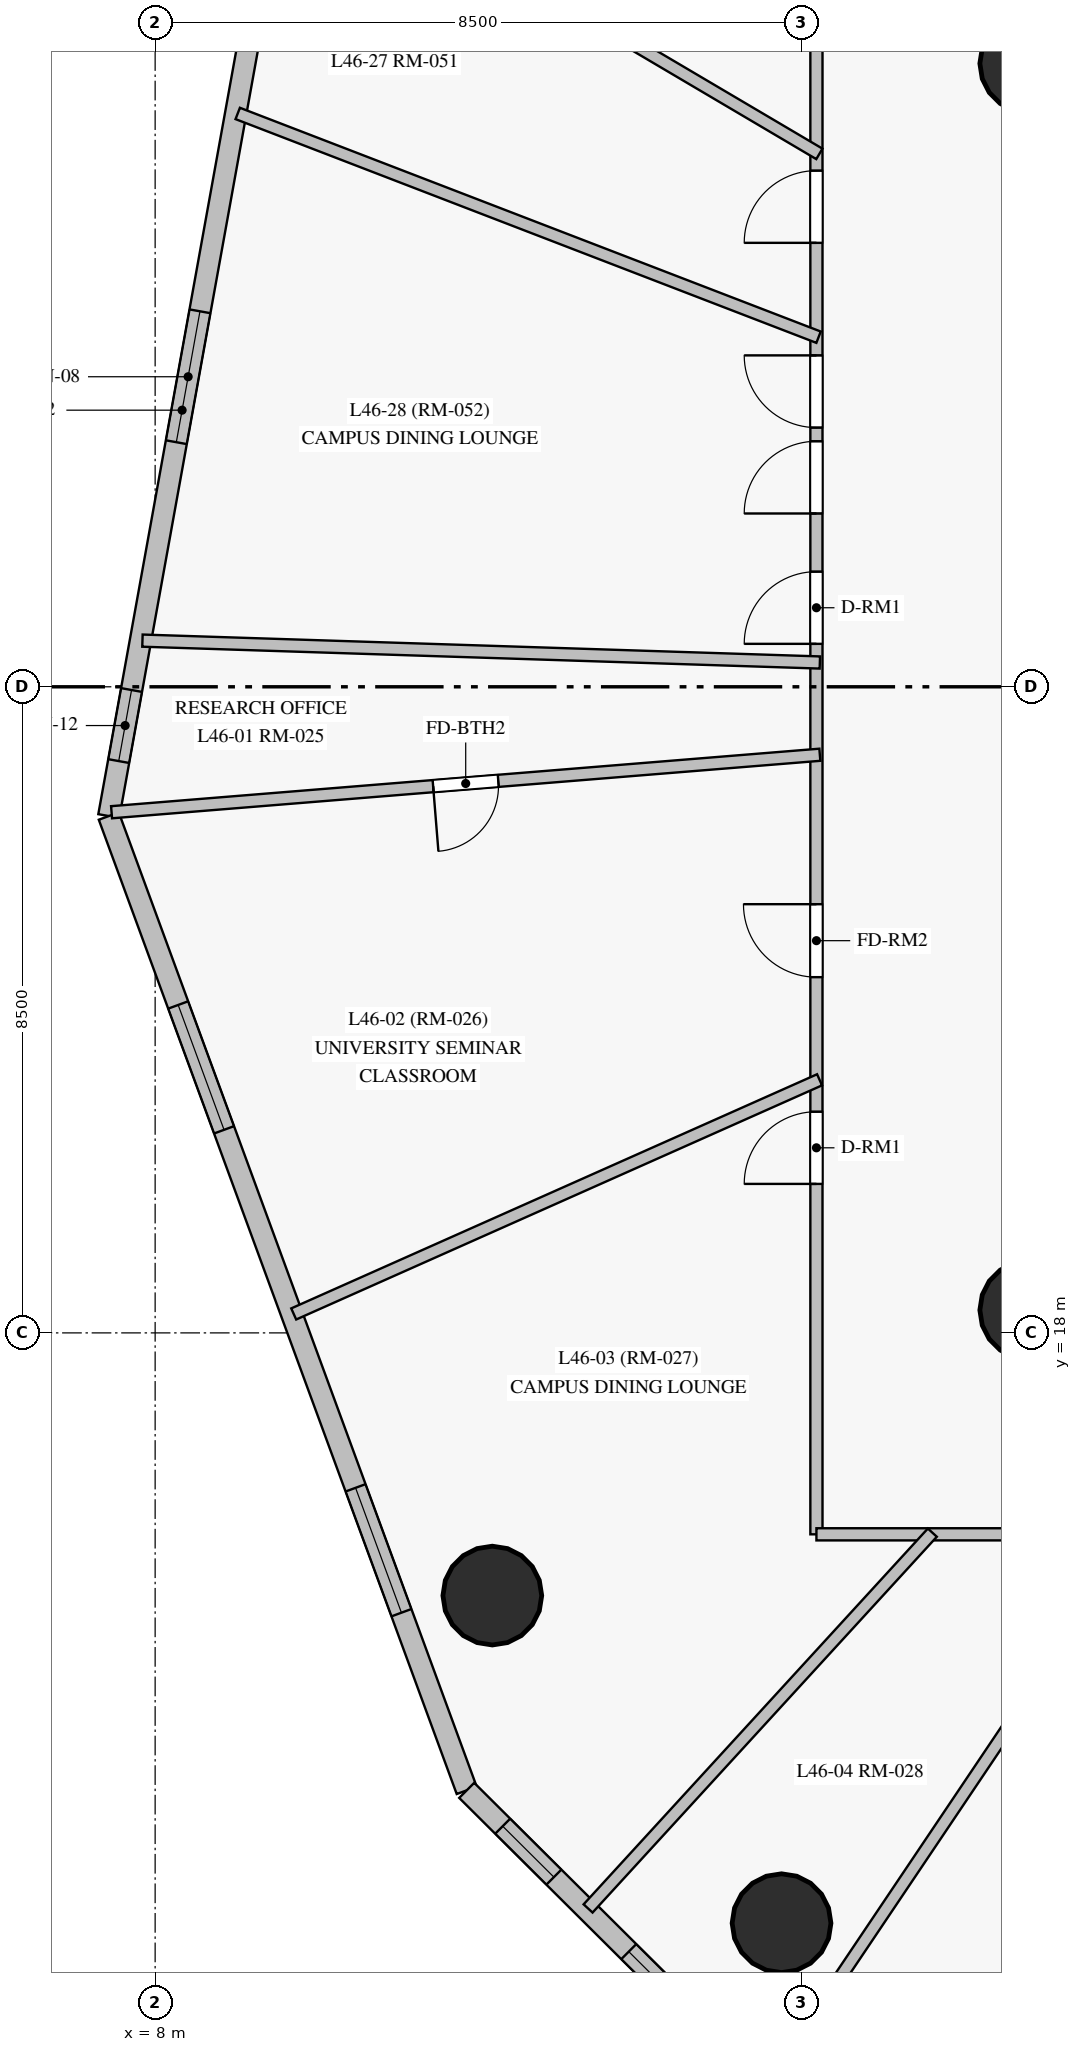
"""IFC4 building model, lengths in metres.
Left out: names, types, materials, properties, quantities, classifications, styles, units other than length and angle.
Written with IfcOpenShell. Run it as: python <this file> out.ifc"""

import sys

from ifc_helpers import new_model, si_unit, direction, frame, frame_2d, origin, origin_with_axes, origin_2d, place, context, subcontext, project, spatial, rectangle, circle, extrude, source, transform, mapped, element, fill, save


model = new_model("IFC4")
c1 = context("Model", 3, precision=1e-05, world=origin(), true_north=direction((0.0, 1.0)))
c2 = subcontext(c1, "Body", "Model", "MODEL_VIEW")
j1 = project(units=[si_unit("LENGTHUNIT", "METRE"), si_unit("PLANEANGLEUNIT", "RADIAN")], contexts=[c1])
p1 = place(None, origin())
s1 = spatial("IfcSite", under=j1, at=p1, CompositionType="ELEMENT")
p2 = place(p1, origin())
s2 = spatial("IfcBuilding", under=s1, at=p2, CompositionType="ELEMENT")
p3 = place(p2, frame((0.0, 0.0, 162.65)))
s3 = spatial("IfcBuildingStorey", under=s2, at=p3, CompositionType="ELEMENT", Elevation=162.65)
m1 = source(origin_with_axes(), c2, "Body", "SweptSolid", [
    extrude(circle(Radius=0.65, at=origin_2d()), origin(), (0.0, 0.0, 1.0), 3.05),
])
for number, where, z_axis, x_axis in (
    (1, (19.5, 18.3, 0.0), (0.0, 0.0, 1.0), (1.0, 0.0, 0.0)),
    (2, (19.5, 34.7, 0.0), (0.0, 0.0, 1.0), (1.0, 0.0, 0.0)),
    (3, (12.436, 14.544, 0.0), (0.0, 0.0, 1.0), (1.0, 0.0, 0.0)),
    (4, (16.241, 10.234, 0.0), (0.0, 0.0, 1.0), (1.0, 0.0, 0.0)),
):
    element("IfcColumn", number, at=place(p3, frame(where, z_axis=z_axis, x_axis=x_axis)), inside=s3, PredefinedType="COLUMN", context=c2, shape_type="MappedRepresentation", body=[
        mapped(m1, transform((0.0, 0.0, 0.0), scale=1.0)),
    ])
p4 = place(p3, frame((9.319, 35.479, 0.0), z_axis=(0.0, 0.0, 1.0), x_axis=(-0.177764832346, -0.984072997486, 0.0)))
e5 = element("IfcWall", 5, at=p4, inside=s3, PredefinedType="SOLIDWALL", context=c2, shape_type="SweptSolid", body=[
    extrude(rectangle(XDim=10.853, YDim=0.28, at=frame_2d((5.426, 0.0))), origin(), (0.0, 0.0, 1.0), 2.825),
])
p5 = place(p4, frame((4.104, 0.0, 0.85)))
e6 = element("IfcOpeningElement", 6, at=p5, cuts=e5, PredefinedType="OPENING", context=c2, shape_type="SweptSolid", body=[
    extrude(rectangle(XDim=1.75, YDim=1.65, at=frame_2d((0.875, 0.825))), frame((0.0, 0.15, 0.0), z_axis=(0.0, -1.0, 0.0), x_axis=(1.0, 0.0, 0.0)), (0.0, 0.0, 1.0), 0.3),
])
p6 = place(p4, frame((9.167, 0.0, 0.85)))
e7 = element("IfcOpeningElement", 7, at=p6, cuts=e5, PredefinedType="OPENING", context=c2, shape_type="SweptSolid", body=[
    extrude(rectangle(XDim=0.95, YDim=1.5, at=frame_2d((0.475, 0.75))), frame((0.0, 0.15, 0.0), z_axis=(0.0, -1.0, 0.0), x_axis=(1.0, 0.0, 0.0)), (0.0, 0.0, 1.0), 0.3),
])
p7 = place(p3, frame((7.39, 24.799, 0.0), z_axis=(0.0, 0.0, 1.0), x_axis=(0.344841895518, -0.938660783828, 0.0)))
e8 = element("IfcWall", 8, at=p7, inside=s3, PredefinedType="SOLIDWALL", context=c2, shape_type="SweptSolid", body=[
    extrude(rectangle(XDim=13.656, YDim=0.28, at=frame_2d((6.828, 0.0))), origin(), (0.0, 0.0, 1.0), 2.825),
])
p8 = place(p7, frame((2.648, 0.0, 0.85)))
e9 = element("IfcOpeningElement", 9, at=p8, cuts=e8, PredefinedType="OPENING", context=c2, shape_type="SweptSolid", body=[
    extrude(rectangle(XDim=1.75, YDim=1.65, at=frame_2d((0.875, 0.825))), frame((0.0, 0.15, 0.0), z_axis=(0.0, -1.0, 0.0), x_axis=(1.0, 0.0, 0.0)), (0.0, 0.0, 1.0), 0.3),
])
p9 = place(p7, frame((9.415, 0.0, 0.85)))
e10 = element("IfcOpeningElement", 10, at=p9, cuts=e8, PredefinedType="OPENING", context=c2, shape_type="SweptSolid", body=[
    extrude(rectangle(XDim=1.75, YDim=1.65, at=frame_2d((0.875, 0.825))), frame((0.0, 0.15, 0.0), z_axis=(0.0, -1.0, 0.0), x_axis=(1.0, 0.0, 0.0)), (0.0, 0.0, 1.0), 0.3),
])
p10 = place(p3, frame((12.099, 11.981, 0.0), z_axis=(0.0, 0.0, 1.0), x_axis=(0.708877198621, -0.705331919932, 0.0)))
e11 = element("IfcWall", 11, at=p10, inside=s3, PredefinedType="SOLIDWALL", context=c2, shape_type="SweptSolid", body=[
    extrude(rectangle(XDim=9.572, YDim=0.28, at=frame_2d((4.786, 0.0))), origin(), (0.0, 0.0, 1.0), 2.825),
])
p11 = place(p10, frame((0.668, 0.0, 0.85)))
e12 = element("IfcOpeningElement", 12, at=p11, cuts=e11, PredefinedType="OPENING", context=c2, shape_type="SweptSolid", body=[
    extrude(rectangle(XDim=0.95, YDim=1.5, at=frame_2d((0.475, 0.75))), frame((0.0, 0.15, 0.0), z_axis=(0.0, -1.0, 0.0), x_axis=(1.0, 0.0, 0.0)), (0.0, 0.0, 1.0), 0.3),
])
p12 = place(p10, frame((3.008, 0.0, 0.85)))
e13 = element("IfcOpeningElement", 13, at=p12, cuts=e11, PredefinedType="OPENING", context=c2, shape_type="SweptSolid", body=[
    extrude(rectangle(XDim=1.75, YDim=1.65, at=frame_2d((0.875, 0.825))), frame((0.0, 0.15, 0.0), z_axis=(0.0, -1.0, 0.0), x_axis=(1.0, 0.0, 0.0)), (0.0, 0.0, 1.0), 0.3),
])
p13 = place(p10, frame((6.338, 0.0, 0.85)))
e14 = element("IfcOpeningElement", 14, at=p13, cuts=e11, PredefinedType="OPENING", context=c2, shape_type="SweptSolid", body=[
    extrude(rectangle(XDim=1.75, YDim=1.65, at=frame_2d((0.875, 0.825))), frame((0.0, 0.15, 0.0), z_axis=(0.0, -1.0, 0.0), x_axis=(1.0, 0.0, 0.0)), (0.0, 0.0, 1.0), 0.3),
])
p14 = place(p3, frame((16.7, 15.35, 0.0), z_axis=(0.0, 0.0, 1.0), x_axis=(0.0, 1.0, 0.0)))
e15 = element("IfcWall", 15, at=p14, inside=s3, PredefinedType="PARTITIONING", context=c2, shape_type="SweptSolid", body=[
    extrude(rectangle(XDim=22.3, YDim=0.16, at=frame_2d((11.15, 0.0))), origin(), (0.0, 0.0, 1.0), 2.275),
])
p15 = place(p14, frame((11.715, 0.0, 0.0)))
e16 = element("IfcOpeningElement", 16, at=p15, cuts=e15, PredefinedType="OPENING", context=c2, shape_type="SweptSolid", body=[
    extrude(rectangle(XDim=0.95, YDim=2.15, at=frame_2d((0.475, 1.075))), frame((0.0, 0.09, 0.0), z_axis=(0.0, -1.0, 0.0), x_axis=(1.0, 0.0, 0.0)), (0.0, 0.0, 1.0), 0.18),
])
p16 = place(p14, frame((7.33, 0.0, 0.0)))
e17 = element("IfcOpeningElement", 17, at=p16, cuts=e15, PredefinedType="OPENING", context=c2, shape_type="SweptSolid", body=[
    extrude(rectangle(XDim=0.96, YDim=2.15, at=frame_2d((0.48, 1.075))), frame((0.0, 0.09, 0.0), z_axis=(0.0, -1.0, 0.0), x_axis=(1.0, 0.0, 0.0)), (0.0, 0.0, 1.0), 0.18),
])
p17 = place(p14, frame((4.61, 0.0, 0.0)))
e18 = element("IfcOpeningElement", 18, at=p17, cuts=e15, PredefinedType="OPENING", context=c2, shape_type="SweptSolid", body=[
    extrude(rectangle(XDim=0.95, YDim=2.15, at=frame_2d((0.475, 1.075))), frame((0.0, 0.09, 0.0), z_axis=(0.0, -1.0, 0.0), x_axis=(1.0, 0.0, 0.0)), (0.0, 0.0, 1.0), 0.18),
])
p18 = place(p14, frame((16.99, 0.0, 0.0)))
e19 = element("IfcOpeningElement", 19, at=p18, cuts=e15, PredefinedType="OPENING", context=c2, shape_type="SweptSolid", body=[
    extrude(rectangle(XDim=0.95, YDim=2.15, at=frame_2d((0.475, 1.075))), frame((0.0, 0.09, 0.0), z_axis=(0.0, -1.0, 0.0), x_axis=(1.0, 0.0, 0.0)), (0.0, 0.0, 1.0), 0.18),
])
p19 = place(p14, frame((14.56, 0.0, 0.0)))
e20 = element("IfcOpeningElement", 20, at=p19, cuts=e15, PredefinedType="OPENING", context=c2, shape_type="SweptSolid", body=[
    extrude(rectangle(XDim=0.95, YDim=2.15, at=frame_2d((0.475, 1.075))), frame((0.0, 0.09, 0.0), z_axis=(0.0, -1.0, 0.0), x_axis=(1.0, 0.0, 0.0)), (0.0, 0.0, 1.0), 0.18),
])
p20 = place(p14, frame((13.43, 0.0, 0.0)))
e21 = element("IfcOpeningElement", 21, at=p20, cuts=e15, PredefinedType="OPENING", context=c2, shape_type="SweptSolid", body=[
    extrude(rectangle(XDim=0.95, YDim=2.15, at=frame_2d((0.475, 1.075))), frame((0.0, 0.09, 0.0), z_axis=(0.0, -1.0, 0.0), x_axis=(1.0, 0.0, 0.0)), (0.0, 0.0, 1.0), 0.18),
])
p21 = place(p3, frame((27.55, 15.35, 0.0), z_axis=(0.0, 0.0, 1.0), x_axis=(-1.0, 0.0, 0.0)))
e22 = element("IfcWall", 22, at=p21, inside=s3, PredefinedType="PARTITIONING", context=c2, shape_type="SweptSolid", body=[
    extrude(rectangle(XDim=10.85, YDim=0.16, at=frame_2d((5.425, 0.0))), origin(), (0.0, 0.0, 1.0), 2.375),
])
p22 = place(p21, frame((7.268, 0.0, 0.0)))
e23 = element("IfcOpeningElement", 23, at=p22, cuts=e22, PredefinedType="OPENING", context=c2, shape_type="SweptSolid", body=[
    extrude(rectangle(XDim=0.95, YDim=2.15, at=frame_2d((0.475, 1.075))), frame((0.0, 0.09, 0.0), z_axis=(0.0, -1.0, 0.0), x_axis=(1.0, 0.0, 0.0)), (0.0, 0.0, 1.0), 0.18),
])
p23 = place(p21, frame((4.95, 0.0, 0.0)))
e24 = element("IfcOpeningElement", 24, at=p23, cuts=e22, PredefinedType="OPENING", context=c2, shape_type="SweptSolid", body=[
    extrude(rectangle(XDim=0.95, YDim=2.15, at=frame_2d((0.475, 1.075))), frame((0.0, 0.09, 0.0), z_axis=(0.0, -1.0, 0.0), x_axis=(1.0, 0.0, 0.0)), (0.0, 0.0, 1.0), 0.18),
])
p24 = place(p21, frame((3.282, 0.0, 0.0)))
e25 = element("IfcOpeningElement", 25, at=p24, cuts=e22, PredefinedType="OPENING", context=c2, shape_type="SweptSolid", body=[
    extrude(rectangle(XDim=0.95, YDim=2.15, at=frame_2d((0.475, 1.075))), frame((0.0, 0.09, 0.0), z_axis=(0.0, -1.0, 0.0), x_axis=(1.0, 0.0, 0.0)), (0.0, 0.0, 1.0), 0.18),
])
p25 = place(p3, frame((23.083, 15.39, 0.0), z_axis=(0.0, 0.0, 1.0), x_axis=(-0.433938094177, -0.900942689866, 0.0)))
e26 = element("IfcWall", 26, at=p25, inside=s3, PredefinedType="PARTITIONING", context=c2, shape_type="SweptSolid", body=[
    extrude(rectangle(XDim=10.728, YDim=0.16, at=frame_2d((5.364, 0.0))), origin(), (0.0, 0.0, 1.0), 2.825),
])
p26 = place(p3, frame((16.745, 25.606, 0.0), z_axis=(0.0, 0.0, 1.0), x_axis=(-0.99672193756, -0.080903517766, 0.0)))
e27 = element("IfcWall", 27, at=p26, inside=s3, PredefinedType="PARTITIONING", context=c2, shape_type="SweptSolid", body=[
    extrude(rectangle(XDim=9.349, YDim=0.16, at=frame_2d((4.674, 0.0))), origin(), (0.0, 0.0, 1.0), 2.825),
])
p27 = place(p26, frame((4.244, 0.0, 0.0)))
e28 = element("IfcOpeningElement", 28, at=p27, cuts=e27, PredefinedType="OPENING", context=c2, shape_type="SweptSolid", body=[
    extrude(rectangle(XDim=0.86, YDim=2.04, at=frame_2d((0.43, 1.02))), frame((0.0, 0.09, 0.0), z_axis=(0.0, -1.0, 0.0), x_axis=(1.0, 0.0, 0.0)), (0.0, 0.0, 1.0), 0.18),
])
p28 = place(p3, frame((7.833, 27.107, 0.0), z_axis=(0.0, 0.0, 1.0), x_axis=(0.999478832783, -0.032280997804, 0.0)))
e29 = element("IfcWall", 29, at=p28, inside=s3, PredefinedType="PARTITIONING", context=c2, shape_type="SweptSolid", body=[
    extrude(rectangle(XDim=8.917, YDim=0.16, at=frame_2d((4.458, 0.0))), origin(), (0.0, 0.0, 1.0), 2.825),
])
p29 = place(p3, frame((20.948, 15.375, 0.0), z_axis=(0.0, 0.0, 1.0), x_axis=(-0.557961935119, -0.82986654286, 0.0)))
e30 = element("IfcWall", 30, at=p29, inside=s3, PredefinedType="PARTITIONING", context=c2, shape_type="SweptSolid", body=[
    extrude(rectangle(XDim=8.781, YDim=0.16, at=frame_2d((4.39, 0.0))), origin(), (0.0, 0.0, 1.0), 2.825),
])
p30 = place(p3, frame((16.728, 31.099, 0.0), z_axis=(0.0, 0.0, 1.0), x_axis=(-0.933150299974, 0.359486463805, 0.0)))
e31 = element("IfcWall", 31, at=p30, inside=s3, PredefinedType="PARTITIONING", context=c2, shape_type="SweptSolid", body=[
    extrude(rectangle(XDim=8.189, YDim=0.16, at=frame_2d((4.094, 0.0))), origin(), (0.0, 0.0, 1.0), 2.825),
])
p31 = place(p3, frame((16.741, 21.33, 0.0), z_axis=(0.0, 0.0, 1.0), x_axis=(-0.913526832816, -0.406778472544, 0.0)))
e32 = element("IfcWall", 32, at=p31, inside=s3, PredefinedType="PARTITIONING", context=c2, shape_type="SweptSolid", body=[
    extrude(rectangle(XDim=7.573, YDim=0.16, at=frame_2d((3.787, 0.0))), origin(), (0.0, 0.0, 1.0), 2.825),
])
p32 = place(p3, frame((18.225, 15.372, 0.0), z_axis=(0.0, 0.0, 1.0), x_axis=(-0.675498710577, -0.737361167955, 0.0)))
e33 = element("IfcWall", 33, at=p32, inside=s3, PredefinedType="PARTITIONING", context=c2, shape_type="SweptSolid", body=[
    extrude(rectangle(XDim=6.705, YDim=0.16, at=frame_2d((3.353, 0.0))), origin(), (0.0, 0.0, 1.0), 2.275),
])
p33 = place(p3, frame((16.739, 33.511, 0.0), z_axis=(0.0, 0.0, 1.0), x_axis=(-0.861200683606, 0.508265071155, 0.0)))
e34 = element("IfcWall", 34, at=p33, inside=s3, PredefinedType="PARTITIONING", context=c2, shape_type="SweptSolid", body=[
    extrude(rectangle(XDim=3.101, YDim=0.16, at=frame_2d((1.551, 0.0))), origin(), (0.0, 0.0, 1.0), 2.825),
])
m2 = source(origin_with_axes(), c2, "Body", "SweptSolid", [
    extrude(rectangle(XDim=1.75, YDim=1.65, at=frame_2d((0.875, 0.825))), frame((0.0, 0.03, 0.0), z_axis=(0.0, -1.0, 0.0), x_axis=(1.0, 0.0, 0.0)), (0.0, 0.0, 1.0), 0.06),
])
p34 = place(p5, origin())
e35 = element("IfcWindow", 35, at=p34, inside=s3, PartitioningType="SINGLE_PANEL", PredefinedType="WINDOW", context=c2, shape_type="MappedRepresentation", body=[
    mapped(m2, transform((0.0, 0.0, 0.0), scale=1.0)),
])
fill(e6, e35)
m3 = source(origin_with_axes(), c2, "Body", "SweptSolid", [
    extrude(rectangle(XDim=0.95, YDim=1.5, at=frame_2d((0.475, 0.75))), frame((0.0, 0.03, 0.0), z_axis=(0.0, -1.0, 0.0), x_axis=(1.0, 0.0, 0.0)), (0.0, 0.0, 1.0), 0.06),
])
p35 = place(p6, origin())
e36 = element("IfcWindow", 36, at=p35, inside=s3, PartitioningType="SINGLE_PANEL", PredefinedType="WINDOW", context=c2, shape_type="MappedRepresentation", body=[
    mapped(m3, transform((0.0, 0.0, 0.0), scale=1.0)),
])
fill(e7, e36)
p36 = place(p8, origin())
e37 = element("IfcWindow", 37, at=p36, inside=s3, PartitioningType="SINGLE_PANEL", PredefinedType="WINDOW", context=c2, shape_type="MappedRepresentation", body=[
    mapped(m2, transform((0.0, 0.0, 0.0), scale=1.0)),
])
fill(e9, e37)
p37 = place(p9, origin())
e38 = element("IfcWindow", 38, at=p37, inside=s3, PartitioningType="SINGLE_PANEL", PredefinedType="WINDOW", context=c2, shape_type="MappedRepresentation", body=[
    mapped(m2, transform((0.0, 0.0, 0.0), scale=1.0)),
])
fill(e10, e38)
p38 = place(p11, origin())
e39 = element("IfcWindow", 39, at=p38, inside=s3, PartitioningType="SINGLE_PANEL", PredefinedType="WINDOW", context=c2, shape_type="MappedRepresentation", body=[
    mapped(m3, transform((0.0, 0.0, 0.0), scale=1.0)),
])
fill(e12, e39)
p39 = place(p12, origin())
e40 = element("IfcWindow", 40, at=p39, inside=s3, PartitioningType="SINGLE_PANEL", PredefinedType="WINDOW", context=c2, shape_type="MappedRepresentation", body=[
    mapped(m2, transform((0.0, 0.0, 0.0), scale=1.0)),
])
fill(e13, e40)
m4 = source(origin_with_axes(), c2, "Body", "SweptSolid", [
    extrude(rectangle(XDim=0.95, YDim=2.15, at=frame_2d((0.475, 1.075))), frame((0.0, 0.025, 0.0), z_axis=(0.0, -1.0, 0.0), x_axis=(1.0, 0.0, 0.0)), (0.0, 0.0, 1.0), 0.05),
])
p40 = place(p15, origin())
e41 = element("IfcDoor", 41, at=p40, inside=s3, OperationType="SINGLE_SWING_LEFT", PredefinedType="DOOR", context=c2, shape_type="MappedRepresentation", body=[
    mapped(m4, transform((0.0, 0.0, 0.0), scale=1.0)),
])
fill(e16, e41)
m5 = source(origin_with_axes(), c2, "Body", "SweptSolid", [
    extrude(rectangle(XDim=0.96, YDim=2.15, at=frame_2d((0.48, 1.075))), frame((0.0, 0.025, 0.0), z_axis=(0.0, -1.0, 0.0), x_axis=(1.0, 0.0, 0.0)), (0.0, 0.0, 1.0), 0.05),
])
p41 = place(p16, origin())
e42 = element("IfcDoor", 42, at=p41, inside=s3, OperationType="SINGLE_SWING_RIGHT", PredefinedType="DOOR", context=c2, shape_type="MappedRepresentation", body=[
    mapped(m5, transform((0.0, 0.0, 0.0), scale=1.0)),
])
fill(e17, e42)
p42 = place(p17, origin())
e43 = element("IfcDoor", 43, at=p42, inside=s3, OperationType="SINGLE_SWING_LEFT", PredefinedType="DOOR", context=c2, shape_type="MappedRepresentation", body=[
    mapped(m4, transform((0.0, 0.0, 0.0), scale=1.0)),
])
fill(e18, e43)
p43 = place(p18, origin())
e44 = element("IfcDoor", 44, at=p43, inside=s3, OperationType="SINGLE_SWING_LEFT", PredefinedType="DOOR", context=c2, shape_type="MappedRepresentation", body=[
    mapped(m4, transform((0.0, 0.0, 0.0), scale=1.0)),
])
fill(e19, e44)
p44 = place(p19, origin())
e45 = element("IfcDoor", 45, at=p44, inside=s3, OperationType="SINGLE_SWING_RIGHT", PredefinedType="DOOR", context=c2, shape_type="MappedRepresentation", body=[
    mapped(m4, transform((0.0, 0.0, 0.0), scale=1.0)),
])
fill(e20, e45)
p45 = place(p20, origin())
e46 = element("IfcDoor", 46, at=p45, inside=s3, OperationType="SINGLE_SWING_LEFT", PredefinedType="DOOR", context=c2, shape_type="MappedRepresentation", body=[
    mapped(m4, transform((0.0, 0.0, 0.0), scale=1.0)),
])
fill(e21, e46)
m6 = source(origin_with_axes(), c2, "Body", "SweptSolid", [
    extrude(rectangle(XDim=0.86, YDim=2.04, at=frame_2d((0.43, 1.02))), frame((0.0, 0.025, 0.0), z_axis=(0.0, -1.0, 0.0), x_axis=(1.0, 0.0, 0.0)), (0.0, 0.0, 1.0), 0.05),
])
p46 = place(p27, origin())
e47 = element("IfcDoor", 47, at=p46, inside=s3, OperationType="SINGLE_SWING_RIGHT", PredefinedType="DOOR", context=c2, shape_type="MappedRepresentation", body=[
    mapped(m6, transform((0.0, 0.0, 0.0), scale=1.0)),
])
fill(e28, e47)
save(model, sys.argv[1])
